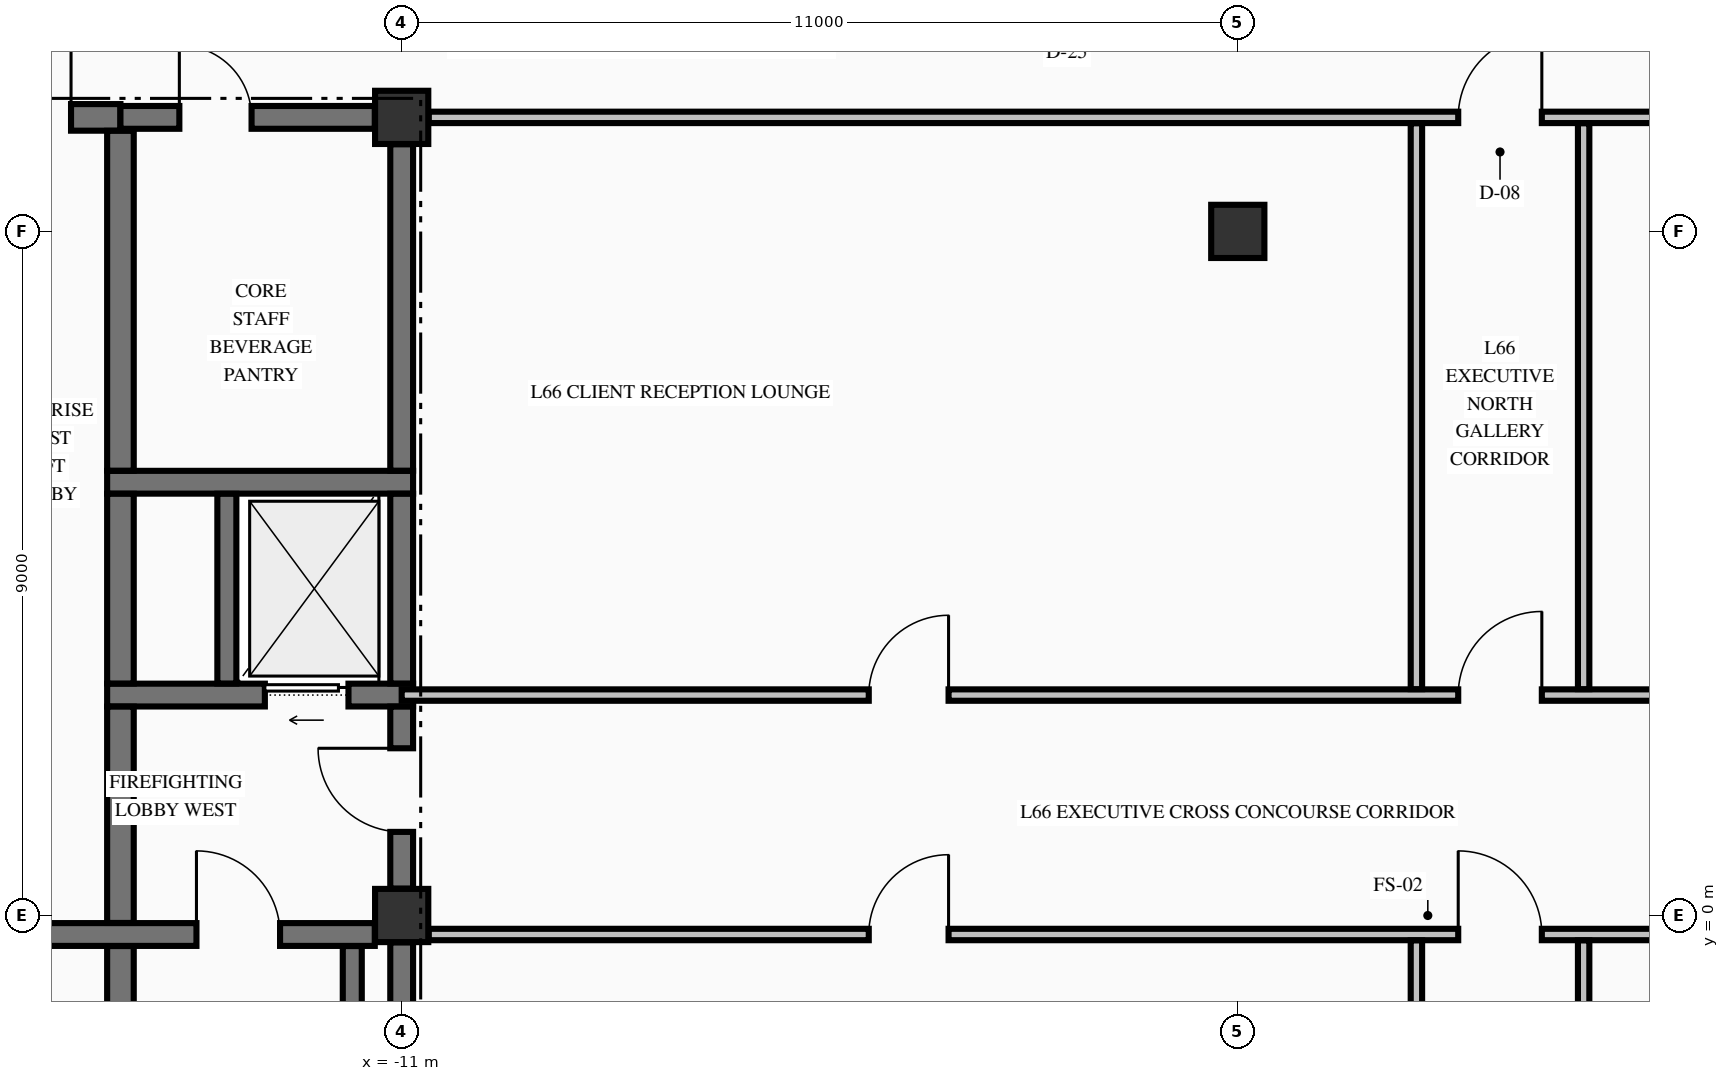
"""IFC4 building model, lengths in metres.
Left out: names, types, materials, properties, quantities, classifications, styles, units other than length and angle.
Written with IfcOpenShell. Run it as: python <this file> out.ifc"""

import sys

from ifc_helpers import new_model, si_unit, direction, frame, frame_2d, origin, origin_2d, place, context, subcontext, project, spatial, rectangle, extrude, element, fill, save


model = new_model("IFC4")
c1 = context("Model", 3, precision=1e-05, world=origin(), true_north=direction((0.0, 1.0)))
c2 = subcontext(c1, "Body", "Model", "MODEL_VIEW")
j1 = project(units=[si_unit("LENGTHUNIT", "METRE"), si_unit("PLANEANGLEUNIT", "RADIAN")], contexts=[c1])
p1 = place(None, origin())
s1 = spatial("IfcSite", under=j1, at=p1, CompositionType="ELEMENT")
p2 = place(p1, origin())
s2 = spatial("IfcBuilding", under=s1, at=p2, CompositionType="ELEMENT")
p3 = place(p2, frame((0.0, 0.0, 249.43)))
s3 = spatial("IfcBuildingStorey", under=s2, at=p3, CompositionType="ELEMENT", Elevation=249.43)
for number, where, z_axis, x_axis in (
    (1, (-11.0, 0.0, -0.425), (0.0, 0.0, 1.0), (1.0, 0.0, 0.0)),
    (2, (-11.0, 10.5, -0.425), (0.0, 0.0, 1.0), (1.0, 0.0, 0.0)),
    (3, (0.0, 9.0, -0.425), (0.0, 0.0, 1.0), (1.0, 0.0, 0.0)),
):
    element("IfcColumn", number, at=place(p3, frame(where, z_axis=z_axis, x_axis=x_axis)), inside=s3, PredefinedType="COLUMN", context=c2, shape_type="SweptSolid", body=[
        extrude(rectangle(XDim=0.7, YDim=0.7, at=origin_2d()), origin(), (0.0, 0.0, 1.0), 5.0),
    ])
p4 = place(p3, frame((-20.571, -0.25, 0.0), z_axis=(0.0, 0.0, 1.0), x_axis=(1.0, 0.0, 0.0)))
e4 = element("IfcWall", 4, at=p4, inside=s3, PredefinedType="SHEAR", context=c2, shape_type="SweptSolid", body=[
    extrude(rectangle(XDim=9.217, YDim=0.3, at=frame_2d((4.608, 0.0))), origin(), (0.0, 0.0, 1.0), 4.575),
])
p5 = place(p4, frame((6.871, 0.0, 0.0)))
e5 = element("IfcOpeningElement", 5, at=p5, cuts=e4, PredefinedType="OPENING", context=c2, shape_type="SweptSolid", body=[
    extrude(rectangle(XDim=1.1, YDim=2.15, at=frame_2d((0.55, 1.075))), frame((0.0, 0.16, 0.0), z_axis=(0.0, -1.0, 0.0), x_axis=(1.0, 0.0, 0.0)), (0.0, 0.0, 1.0), 0.32),
])
p6 = place(p3, frame((-14.875, 2.9, 0.0), z_axis=(0.0, 0.0, 1.0), x_axis=(1.0, 0.0, 0.0)))
e6 = element("IfcWall", 6, at=p6, inside=s3, PredefinedType="SHEAR", context=c2, shape_type="SweptSolid", body=[
    extrude(rectangle(XDim=4.025, YDim=0.3, at=frame_2d((2.012, 0.0))), origin(), (0.0, 0.0, 1.0), 4.575),
])
p7 = place(p6, frame((2.075, 0.0, 0.0)))
e7 = element("IfcOpeningElement", 7, at=p7, cuts=e6, PredefinedType="OPENING", context=c2, shape_type="SweptSolid", body=[
    extrude(rectangle(XDim=1.1, YDim=2.2, at=frame_2d((0.55, 1.1))), frame((0.0, 0.16, 0.0), z_axis=(0.0, -1.0, 0.0), x_axis=(1.0, 0.0, 0.0)), (0.0, 0.0, 1.0), 0.32),
])
p8 = place(p3, frame((-14.875, 5.7, 0.0), z_axis=(0.0, 0.0, 1.0), x_axis=(1.0, 0.0, 0.0)))
e8 = element("IfcWall", 8, at=p8, inside=s3, PredefinedType="SHEAR", context=c2, shape_type="SweptSolid", body=[
    extrude(rectangle(XDim=4.025, YDim=0.3, at=frame_2d((2.012, 0.0))), origin(), (0.0, 0.0, 1.0), 4.575),
])
p9 = place(p3, frame((-19.646, 10.5, 0.0), z_axis=(0.0, 0.0, 1.0), x_axis=(1.0, 0.0, 0.0)))
e9 = element("IfcWall", 9, at=p9, inside=s3, PredefinedType="SHEAR", context=c2, shape_type="SweptSolid", body=[
    extrude(rectangle(XDim=4.946, YDim=0.35, at=frame_2d((2.473, 0.0))), origin(), (0.0, 0.0, 1.0), 4.575),
])
p10 = place(p9, frame((3.196, 0.0, 0.0)))
e10 = element("IfcOpeningElement", 10, at=p10, cuts=e9, PredefinedType="OPENING", context=c2, shape_type="SweptSolid", body=[
    extrude(rectangle(XDim=1.1, YDim=2.15, at=frame_2d((0.55, 1.075))), frame((0.0, 0.185, 0.0), z_axis=(0.0, -1.0, 0.0), x_axis=(1.0, 0.0, 0.0)), (0.0, 0.0, 1.0), 0.37),
])
p11 = place(p3, frame((-14.7, 10.5, 0.0), z_axis=(0.0, 0.0, 1.0), x_axis=(1.0, 0.0, 0.0)))
e11 = element("IfcWall", 11, at=p11, inside=s3, PredefinedType="SHEAR", context=c2, shape_type="SweptSolid", body=[
    extrude(rectangle(XDim=3.346, YDim=0.3, at=frame_2d((1.673, 0.0))), origin(), (0.0, 0.0, 1.0), 4.575),
])
p12 = place(p11, frame((0.775, 0.0, 0.0)))
e12 = element("IfcOpeningElement", 12, at=p12, cuts=e11, PredefinedType="OPENING", context=c2, shape_type="SweptSolid", body=[
    extrude(rectangle(XDim=0.95, YDim=2.15, at=frame_2d((0.475, 1.075))), frame((0.0, 0.16, 0.0), z_axis=(0.0, -1.0, 0.0), x_axis=(1.0, 0.0, 0.0)), (0.0, 0.0, 1.0), 0.32),
])
p13 = place(p3, frame((-10.644, -0.25, 0.0), z_axis=(0.0, 0.0, 1.0), x_axis=(1.0, 0.0, 0.0)))
e13 = element("IfcWall", 13, at=p13, inside=s3, PredefinedType="PARTITIONING", context=c2, shape_type="SweptSolid", body=[
    extrude(rectangle(XDim=21.288, YDim=0.15, at=frame_2d((10.644, 0.0))), origin(), (0.0, 0.0, 1.0), 4.575),
])
p14 = place(p13, frame((13.544, 0.0, 0.0)))
e14 = element("IfcOpeningElement", 14, at=p14, cuts=e13, PredefinedType="OPENING", context=c2, shape_type="SweptSolid", body=[
    extrude(rectangle(XDim=1.1, YDim=2.15, at=frame_2d((0.55, 1.075))), frame((0.0, 0.085, 0.0), z_axis=(0.0, -1.0, 0.0), x_axis=(1.0, 0.0, 0.0)), (0.0, 0.0, 1.0), 0.17),
])
p15 = place(p13, frame((5.789, 0.0, 0.0)))
e15 = element("IfcOpeningElement", 15, at=p15, cuts=e13, PredefinedType="OPENING", context=c2, shape_type="SweptSolid", body=[
    extrude(rectangle(XDim=1.05, YDim=2.15, at=frame_2d((0.525, 1.075))), frame((0.0, 0.085, 0.0), z_axis=(0.0, -1.0, 0.0), x_axis=(1.0, 0.0, 0.0)), (0.0, 0.0, 1.0), 0.17),
])
p16 = place(p13, frame((17.949, 0.0, 0.0)))
e16 = element("IfcOpeningElement", 16, at=p16, cuts=e13, PredefinedType="OPENING", context=c2, shape_type="SweptSolid", body=[
    extrude(rectangle(XDim=0.95, YDim=2.15, at=frame_2d((0.475, 1.075))), frame((0.0, 0.085, 0.0), z_axis=(0.0, -1.0, 0.0), x_axis=(1.0, 0.0, 0.0)), (0.0, 0.0, 1.0), 0.17),
])
p17 = place(p3, frame((-11.0, 2.9, 0.0), z_axis=(0.0, 0.0, 1.0), x_axis=(1.0, 0.0, 0.0)))
e17 = element("IfcWall", 17, at=p17, inside=s3, PredefinedType="PARTITIONING", context=c2, shape_type="SweptSolid", body=[
    extrude(rectangle(XDim=22.0, YDim=0.15, at=frame_2d((11.0, 0.0))), origin(), (0.0, 0.0, 1.0), 4.575),
])
p18 = place(p17, frame((13.9, 0.0, 0.0)))
e18 = element("IfcOpeningElement", 18, at=p18, cuts=e17, PredefinedType="OPENING", context=c2, shape_type="SweptSolid", body=[
    extrude(rectangle(XDim=1.1, YDim=2.15, at=frame_2d((0.55, 1.075))), frame((0.0, 0.085, 0.0), z_axis=(0.0, -1.0, 0.0), x_axis=(1.0, 0.0, 0.0)), (0.0, 0.0, 1.0), 0.17),
])
p19 = place(p17, frame((6.145, 0.0, 0.0)))
e19 = element("IfcOpeningElement", 19, at=p19, cuts=e17, PredefinedType="OPENING", context=c2, shape_type="SweptSolid", body=[
    extrude(rectangle(XDim=1.05, YDim=2.15, at=frame_2d((0.525, 1.075))), frame((0.0, 0.085, 0.0), z_axis=(0.0, -1.0, 0.0), x_axis=(1.0, 0.0, 0.0)), (0.0, 0.0, 1.0), 0.17),
])
p20 = place(p17, frame((18.23, 0.0, 0.0)))
e20 = element("IfcOpeningElement", 20, at=p20, cuts=e17, PredefinedType="OPENING", context=c2, shape_type="SweptSolid", body=[
    extrude(rectangle(XDim=1.1, YDim=2.15, at=frame_2d((0.55, 1.075))), frame((0.0, 0.085, 0.0), z_axis=(0.0, -1.0, 0.0), x_axis=(1.0, 0.0, 0.0)), (0.0, 0.0, 1.0), 0.17),
])
p21 = place(p3, frame((-10.644, 10.5, 0.0), z_axis=(0.0, 0.0, 1.0), x_axis=(1.0, 0.0, 0.0)))
e21 = element("IfcWall", 21, at=p21, inside=s3, PredefinedType="PARTITIONING", context=c2, shape_type="SweptSolid", body=[
    extrude(rectangle(XDim=21.288, YDim=0.15, at=frame_2d((10.644, 0.0))), origin(), (0.0, 0.0, 1.0), 4.575),
])
p22 = place(p21, frame((13.544, 0.0, 0.0)))
e22 = element("IfcOpeningElement", 22, at=p22, cuts=e21, PredefinedType="OPENING", context=c2, shape_type="SweptSolid", body=[
    extrude(rectangle(XDim=1.1, YDim=2.15, at=frame_2d((0.55, 1.075))), frame((0.0, 0.085, 0.0), z_axis=(0.0, -1.0, 0.0), x_axis=(1.0, 0.0, 0.0)), (0.0, 0.0, 1.0), 0.17),
])
p23 = place(p3, frame((-14.7, -9.773, 0.0), z_axis=(0.0, 0.0, 1.0), x_axis=(0.0, 1.0, 0.0)))
e23 = element("IfcWall", 23, at=p23, inside=s3, PredefinedType="SHEAR", context=c2, shape_type="SweptSolid", body=[
    extrude(rectangle(XDim=9.371, YDim=0.35, at=frame_2d((4.686, 0.0))), origin(), (0.0, 0.0, 1.0), 4.575),
])
p24 = place(p3, frame((-14.7, -0.098, 0.0), z_axis=(0.0, 0.0, 1.0), x_axis=(0.0, 1.0, 0.0)))
e24 = element("IfcWall", 24, at=p24, inside=s3, PredefinedType="SHEAR", context=c2, shape_type="SweptSolid", body=[
    extrude(rectangle(XDim=2.846, YDim=0.35, at=frame_2d((1.423, 0.0))), origin(), (0.0, 0.0, 1.0), 4.575),
])
p25 = place(p3, frame((-14.7, 3.052, 0.0), z_axis=(0.0, 0.0, 1.0), x_axis=(0.0, 1.0, 0.0)))
e25 = element("IfcWall", 25, at=p25, inside=s3, PredefinedType="SHEAR", context=c2, shape_type="SweptSolid", body=[
    extrude(rectangle(XDim=2.496, YDim=0.35, at=frame_2d((1.248, 0.0))), origin(), (0.0, 0.0, 1.0), 4.575),
])
p26 = place(p3, frame((-14.7, 5.852, 0.0), z_axis=(0.0, 0.0, 1.0), x_axis=(0.0, 1.0, 0.0)))
e26 = element("IfcWall", 26, at=p26, inside=s3, PredefinedType="SHEAR", context=c2, shape_type="SweptSolid", body=[
    extrude(rectangle(XDim=4.471, YDim=0.35, at=frame_2d((2.235, 0.0))), origin(), (0.0, 0.0, 1.0), 4.575),
])
p27 = place(p3, frame((-13.3, 3.052, 0.0), z_axis=(0.0, 0.0, 1.0), x_axis=(0.0, 1.0, 0.0)))
e27 = element("IfcWall", 27, at=p27, inside=s3, PredefinedType="SOLIDWALL", context=c2, shape_type="SweptSolid", body=[
    extrude(rectangle(XDim=2.496, YDim=0.25, at=frame_2d((1.248, 0.0))), origin(), (0.0, 0.0, 1.0), 4.575),
])
p28 = place(p3, frame((-11.65, -9.798, 0.0), z_axis=(0.0, 0.0, 1.0), x_axis=(0.0, 1.0, 0.0)))
e28 = element("IfcWall", 28, at=p28, inside=s3, PredefinedType="SOLIDWALL", context=c2, shape_type="SweptSolid", body=[
    extrude(rectangle(XDim=9.396, YDim=0.25, at=frame_2d((4.698, 0.0))), origin(), (0.0, 0.0, 1.0), 4.575),
])
p29 = place(p3, frame((-11.0, -9.596, 0.0), z_axis=(0.0, 0.0, 1.0), x_axis=(0.0, 1.0, 0.0)))
e29 = element("IfcWall", 29, at=p29, inside=s3, PredefinedType="SHEAR", context=c2, shape_type="SweptSolid", body=[
    extrude(rectangle(XDim=9.242, YDim=0.3, at=frame_2d((4.621, 0.0))), origin(), (0.0, 0.0, 1.0), 4.575),
])
p30 = place(p3, frame((-11.0, 0.354, 0.0), z_axis=(0.0, 0.0, 1.0), x_axis=(0.0, 1.0, 0.0)))
e30 = element("IfcWall", 30, at=p30, inside=s3, PredefinedType="SHEAR", context=c2, shape_type="SweptSolid", body=[
    extrude(rectangle(XDim=2.394, YDim=0.3, at=frame_2d((1.197, 0.0))), origin(), (0.0, 0.0, 1.0), 4.575),
])
p31 = place(p30, frame((0.746, 0.0, 0.0)))
e31 = element("IfcOpeningElement", 31, at=p31, cuts=e30, PredefinedType="OPENING", context=c2, shape_type="SweptSolid", body=[
    extrude(rectangle(XDim=1.1, YDim=2.15, at=frame_2d((0.55, 1.075))), frame((0.0, 0.16, 0.0), z_axis=(0.0, -1.0, 0.0), x_axis=(1.0, 0.0, 0.0)), (0.0, 0.0, 1.0), 0.32),
])
p32 = place(p3, frame((-11.0, 3.052, 0.0), z_axis=(0.0, 0.0, 1.0), x_axis=(0.0, 1.0, 0.0)))
e32 = element("IfcWall", 32, at=p32, inside=s3, PredefinedType="SHEAR", context=c2, shape_type="SweptSolid", body=[
    extrude(rectangle(XDim=2.496, YDim=0.3, at=frame_2d((1.248, 0.0))), origin(), (0.0, 0.0, 1.0), 4.575),
])
p33 = place(p3, frame((-11.0, 5.852, 0.0), z_axis=(0.0, 0.0, 1.0), x_axis=(0.0, 1.0, 0.0)))
e33 = element("IfcWall", 33, at=p33, inside=s3, PredefinedType="SHEAR", context=c2, shape_type="SweptSolid", body=[
    extrude(rectangle(XDim=4.294, YDim=0.3, at=frame_2d((2.147, 0.0))), origin(), (0.0, 0.0, 1.0), 4.575),
])
p34 = place(p3, frame((2.35, -9.872, 0.0), z_axis=(0.0, 0.0, 1.0), x_axis=(0.0, 1.0, 0.0)))
e34 = element("IfcWall", 34, at=p34, inside=s3, PredefinedType="PARTITIONING", context=c2, shape_type="SweptSolid", body=[
    extrude(rectangle(XDim=9.544, YDim=0.15, at=frame_2d((4.772, 0.0))), origin(), (0.0, 0.0, 1.0), 4.575),
])
p35 = place(p3, frame((2.35, 2.978, 0.0), z_axis=(0.0, 0.0, 1.0), x_axis=(0.0, 1.0, 0.0)))
e35 = element("IfcWall", 35, at=p35, inside=s3, PredefinedType="PARTITIONING", context=c2, shape_type="SweptSolid", body=[
    extrude(rectangle(XDim=7.444, YDim=0.15, at=frame_2d((3.722, 0.0))), origin(), (0.0, 0.0, 1.0), 4.575),
])
p36 = place(p3, frame((4.55, -4.747, 0.0), z_axis=(0.0, 0.0, 1.0), x_axis=(0.0, 1.0, 0.0)))
e36 = element("IfcWall", 36, at=p36, inside=s3, PredefinedType="PARTITIONING", context=c2, shape_type="SweptSolid", body=[
    extrude(rectangle(XDim=4.419, YDim=0.15, at=frame_2d((2.209, 0.0))), origin(), (0.0, 0.0, 1.0), 4.575),
])
p37 = place(p3, frame((4.55, 2.978, 0.0), z_axis=(0.0, 0.0, 1.0), x_axis=(0.0, 1.0, 0.0)))
e37 = element("IfcWall", 37, at=p37, inside=s3, PredefinedType="PARTITIONING", context=c2, shape_type="SweptSolid", body=[
    extrude(rectangle(XDim=7.444, YDim=0.15, at=frame_2d((3.722, 0.0))), origin(), (0.0, 0.0, 1.0), 4.575),
])
p38 = place(p5, origin())
e38 = element("IfcDoor", 38, at=p38, inside=s3, OperationType="SINGLE_SWING_LEFT", PredefinedType="DOOR", context=c2, shape_type="SweptSolid", body=[
    extrude(rectangle(XDim=1.1, YDim=2.15, at=frame_2d((0.55, 1.075))), frame((0.0, 0.025, 0.0), z_axis=(0.0, -1.0, 0.0), x_axis=(1.0, 0.0, 0.0)), (0.0, 0.0, 1.0), 0.05),
])
fill(e5, e38)
p39 = place(p31, origin())
e39 = element("IfcDoor", 39, at=p39, inside=s3, OperationType="SINGLE_SWING_RIGHT", PredefinedType="DOOR", context=c2, shape_type="SweptSolid", body=[
    extrude(rectangle(XDim=1.1, YDim=2.15, at=frame_2d((0.55, 1.075))), frame((0.0, 0.025, 0.0), z_axis=(0.0, -1.0, 0.0), x_axis=(1.0, 0.0, 0.0)), (0.0, 0.0, 1.0), 0.05),
])
fill(e31, e39)
p40 = place(p7, origin())
e40 = element("IfcDoor", 40, at=p40, inside=s3, OperationType="SLIDING_TO_LEFT", PredefinedType="DOOR", context=c2, shape_type="SweptSolid", body=[
    extrude(rectangle(XDim=1.1, YDim=2.2, at=frame_2d((0.55, 1.1))), frame((0.0, 0.025, 0.0), z_axis=(0.0, -1.0, 0.0), x_axis=(1.0, 0.0, 0.0)), (0.0, 0.0, 1.0), 0.05),
])
fill(e7, e40)
p41 = place(p12, origin())
e41 = element("IfcDoor", 41, at=p41, inside=s3, OperationType="SINGLE_SWING_LEFT", PredefinedType="DOOR", context=c2, shape_type="SweptSolid", body=[
    extrude(rectangle(XDim=0.95, YDim=2.15, at=frame_2d((0.475, 1.075))), frame((0.0, 0.025, 0.0), z_axis=(0.0, -1.0, 0.0), x_axis=(1.0, 0.0, 0.0)), (0.0, 0.0, 1.0), 0.05),
])
fill(e12, e41)
p42 = place(p10, origin())
e42 = element("IfcDoor", 42, at=p42, inside=s3, OperationType="SINGLE_SWING_RIGHT", PredefinedType="DOOR", context=c2, shape_type="SweptSolid", body=[
    extrude(rectangle(XDim=1.1, YDim=2.15, at=frame_2d((0.55, 1.075))), frame((0.0, 0.025, 0.0), z_axis=(0.0, -1.0, 0.0), x_axis=(1.0, 0.0, 0.0)), (0.0, 0.0, 1.0), 0.05),
])
fill(e10, e42)
p43 = place(p22, origin())
e43 = element("IfcDoor", 43, at=p43, inside=s3, OperationType="SINGLE_SWING_RIGHT", PredefinedType="DOOR", context=c2, shape_type="SweptSolid", body=[
    extrude(rectangle(XDim=1.1, YDim=2.15, at=frame_2d((0.55, 1.075))), frame((0.0, 0.025, 0.0), z_axis=(0.0, -1.0, 0.0), x_axis=(1.0, 0.0, 0.0)), (0.0, 0.0, 1.0), 0.05),
])
fill(e22, e43)
p44 = place(p18, origin())
e44 = element("IfcDoor", 44, at=p44, inside=s3, OperationType="SINGLE_SWING_RIGHT", PredefinedType="DOOR", context=c2, shape_type="SweptSolid", body=[
    extrude(rectangle(XDim=1.1, YDim=2.15, at=frame_2d((0.55, 1.075))), frame((0.0, 0.025, 0.0), z_axis=(0.0, -1.0, 0.0), x_axis=(1.0, 0.0, 0.0)), (0.0, 0.0, 1.0), 0.05),
])
fill(e18, e44)
p45 = place(p14, origin())
e45 = element("IfcDoor", 45, at=p45, inside=s3, OperationType="SINGLE_SWING_LEFT", PredefinedType="DOOR", context=c2, shape_type="SweptSolid", body=[
    extrude(rectangle(XDim=1.1, YDim=2.15, at=frame_2d((0.55, 1.075))), frame((0.0, 0.025, 0.0), z_axis=(0.0, -1.0, 0.0), x_axis=(1.0, 0.0, 0.0)), (0.0, 0.0, 1.0), 0.05),
])
fill(e14, e45)
p46 = place(p19, origin())
e46 = element("IfcDoor", 46, at=p46, inside=s3, OperationType="SINGLE_SWING_RIGHT", PredefinedType="DOOR", context=c2, shape_type="SweptSolid", body=[
    extrude(rectangle(XDim=1.05, YDim=2.15, at=frame_2d((0.525, 1.075))), frame((0.0, 0.025, 0.0), z_axis=(0.0, -1.0, 0.0), x_axis=(1.0, 0.0, 0.0)), (0.0, 0.0, 1.0), 0.05),
])
fill(e19, e46)
p47 = place(p15, origin())
e47 = element("IfcDoor", 47, at=p47, inside=s3, OperationType="SINGLE_SWING_RIGHT", PredefinedType="DOOR", context=c2, shape_type="SweptSolid", body=[
    extrude(rectangle(XDim=1.05, YDim=2.15, at=frame_2d((0.525, 1.075))), frame((0.0, 0.025, 0.0), z_axis=(0.0, -1.0, 0.0), x_axis=(1.0, 0.0, 0.0)), (0.0, 0.0, 1.0), 0.05),
])
fill(e15, e47)
save(model, sys.argv[1])
